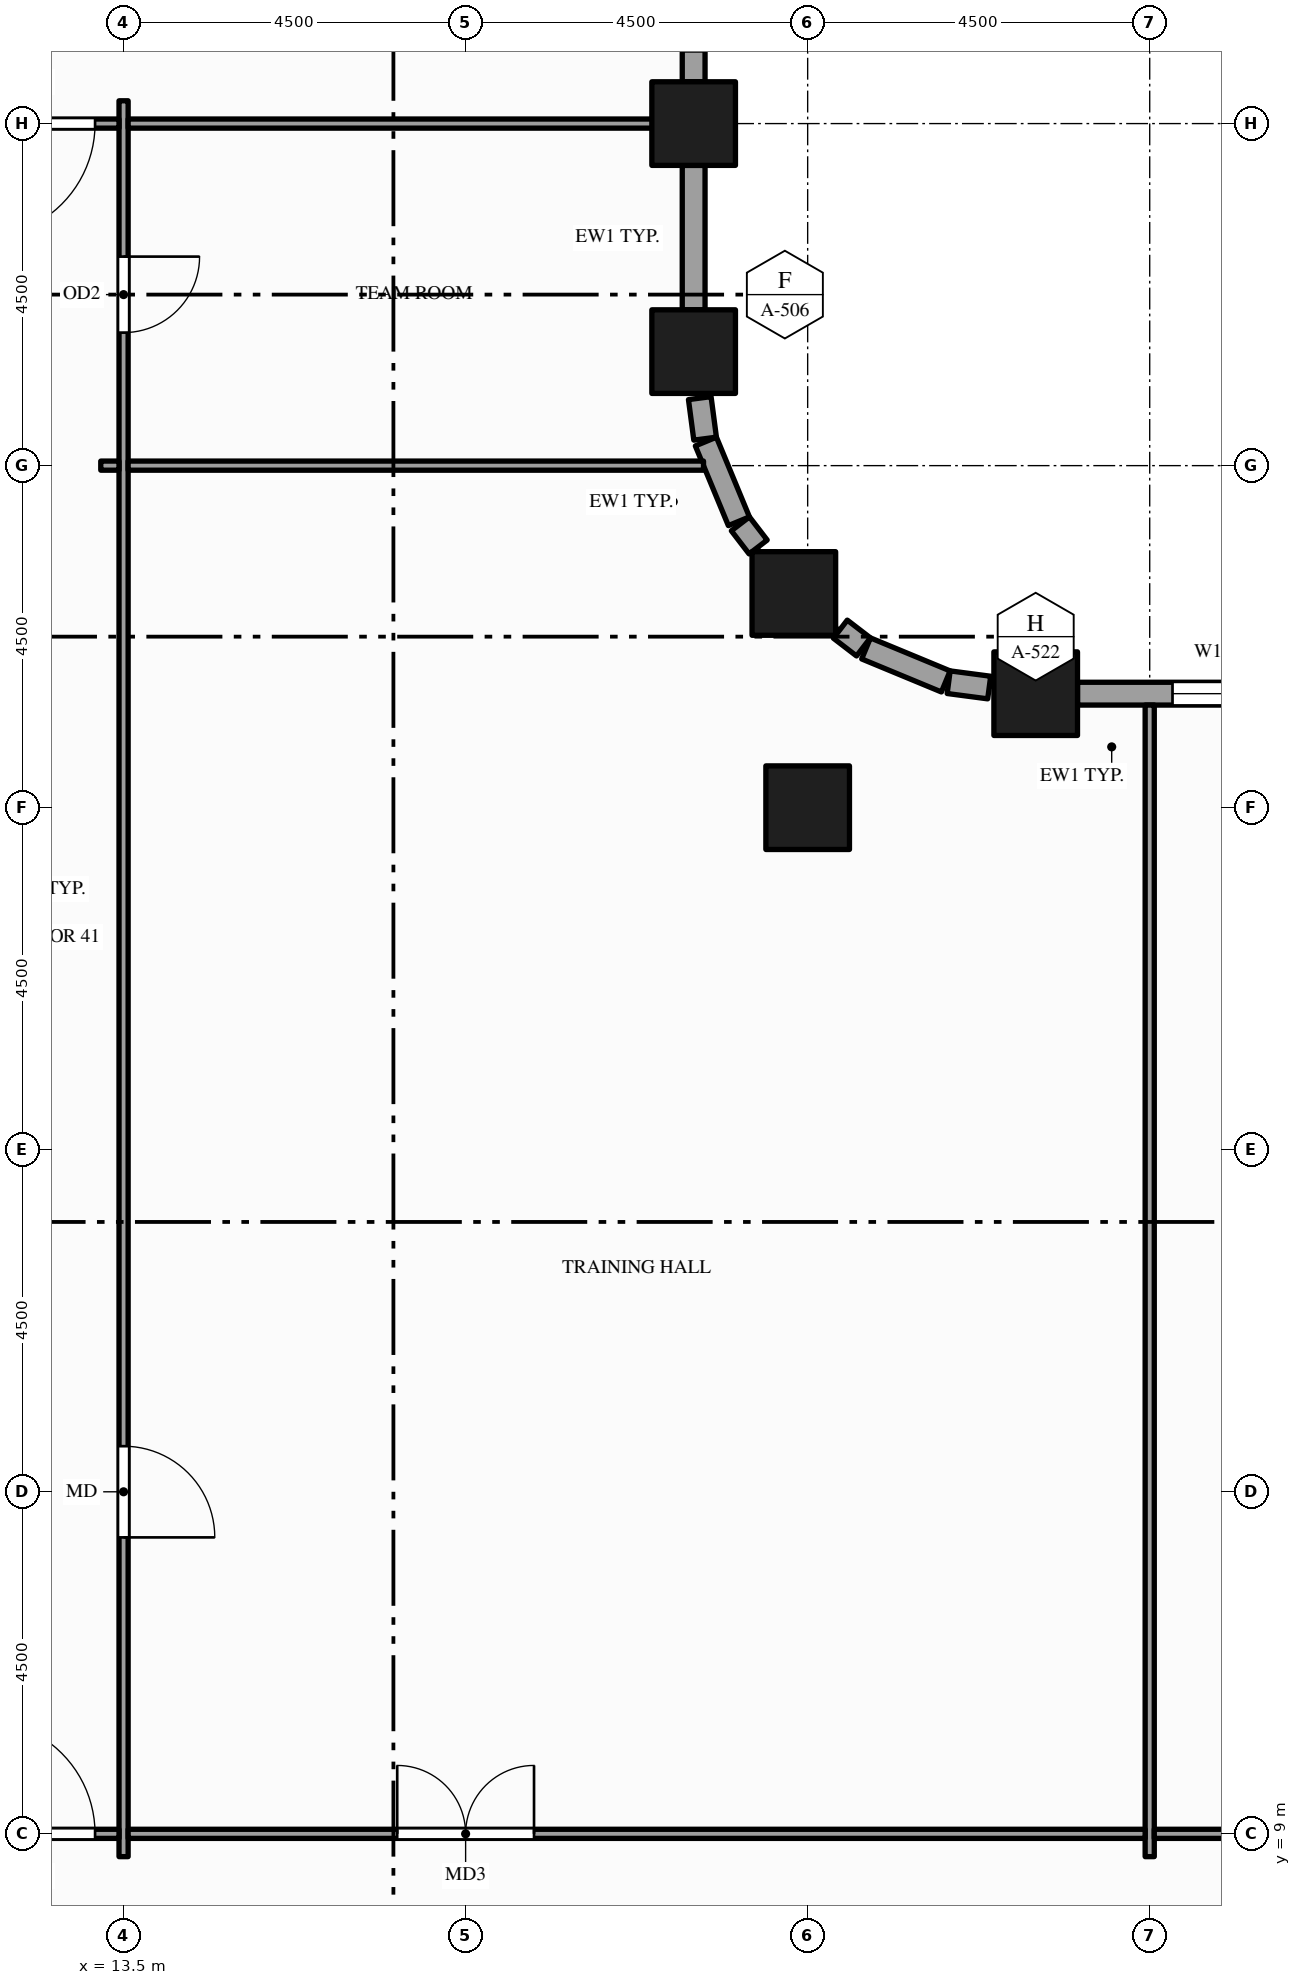
"""IFC4 building model, lengths in metres.
Left out: names, types, materials, properties, quantities, classifications, styles, units other than length and angle.
Written with IfcOpenShell. Run it as: python <this file> out.ifc"""

import sys

from ifc_helpers import new_model, si_unit, direction, frame, frame_2d, origin, origin_2d, place, context, subcontext, project, spatial, rectangle, hollow_rectangle, extrude, element, fill, save


model = new_model("IFC4")
c1 = context("Model", 3, precision=1e-05, world=origin(), true_north=direction((0.0, 1.0)))
c2 = subcontext(c1, "Body", "Model", "MODEL_VIEW")
j1 = project(units=[si_unit("LENGTHUNIT", "METRE"), si_unit("PLANEANGLEUNIT", "RADIAN")], contexts=[c1])
p1 = place(None, origin())
s1 = spatial("IfcSite", under=j1, at=p1, CompositionType="ELEMENT")
p2 = place(p1, origin())
s2 = spatial("IfcBuilding", under=s1, at=p2, CompositionType="ELEMENT")
p3 = place(p2, frame((0.0, 0.0, 57.0)))
s3 = spatial("IfcBuildingStorey", under=s2, at=p3, CompositionType="ELEMENT", Elevation=57.0)
for number, where, z_axis, x_axis in (
    (1, (21.0, 28.5, -0.15), (0.0, 0.0, 1.0), (1.0, 0.0, 0.0)),
    (2, (21.0, 31.5, -0.15), (0.0, 0.0, 1.0), (1.0, 0.0, 0.0)),
    (3, (22.318, 25.318, -0.15), (0.0, 0.0, 1.0), (1.0, 0.0, 0.0)),
    (4, (22.5, 22.5, -0.15), (0.0, 0.0, 1.0), (1.0, 0.0, 0.0)),
    (5, (25.5, 24.0, -0.15), (0.0, 0.0, 1.0), (1.0, 0.0, 0.0)),
):
    element("IfcColumn", number, at=place(p3, frame(where, z_axis=z_axis, x_axis=x_axis)), inside=s3, PredefinedType="COLUMN", context=c2, shape_type="SweptSolid", body=[
        extrude(hollow_rectangle(XDim=1.1, YDim=1.1, WallThickness=0.06, at=origin_2d()), origin(), (0.0, 0.0, 1.0), 4.0),
    ])
p4 = place(p3, frame((30.95, 24.0, 0.0), z_axis=(0.0, 0.0, 1.0), x_axis=(-1.0, 0.0, 0.0)))
e6 = element("IfcWall", 6, at=p4, inside=s3, PredefinedType="STANDARD", context=c2, shape_type="SweptSolid", body=[
    extrude(rectangle(XDim=4.9, YDim=0.3, at=frame_2d((2.45, 0.0))), origin(), (0.0, 0.0, 1.0), 3.144),
])
p5 = place(p4, frame((0.4, 0.0, 0.9)))
e7 = element("IfcOpeningElement", 7, at=p5, cuts=e6, PredefinedType="OPENING", context=c2, shape_type="SweptSolid", body=[
    extrude(rectangle(XDim=1.0, YDim=2.0, at=frame_2d((0.5, 1.0))), frame((0.0, 0.16, 0.0), z_axis=(0.0, -1.0, 0.0), x_axis=(1.0, 0.0, 0.0)), (0.0, 0.0, 1.0), 0.32),
])
p6 = place(p4, frame((2.0, 0.0, 0.9)))
e8 = element("IfcOpeningElement", 8, at=p6, cuts=e6, PredefinedType="OPENING", context=c2, shape_type="SweptSolid", body=[
    extrude(rectangle(XDim=1.65, YDim=2.0, at=frame_2d((0.825, 1.0))), frame((0.0, 0.16, 0.0), z_axis=(0.0, -1.0, 0.0), x_axis=(1.0, 0.0, 0.0)), (0.0, 0.0, 1.0), 0.32),
])
p7 = place(p3, frame((24.888, 24.081, 0.0), z_axis=(0.0, 0.0, 1.0), x_axis=(-0.991417173479, 0.130736330569, 0.0)))
e9 = element("IfcWall", 9, at=p7, inside=s3, PredefinedType="STANDARD", context=c2, shape_type="SweptSolid", body=[
    extrude(rectangle(XDim=0.538, YDim=0.3, at=frame_2d((0.269, 0.0))), origin(), (0.0, 0.0, 1.0), 2.938),
])
p8 = place(p3, frame((24.317, 24.161, 0.0), z_axis=(0.0, 0.0, 1.0), x_axis=(-0.923914616768, 0.382598720491, 0.0)))
e10 = element("IfcWall", 10, at=p8, inside=s3, PredefinedType="STANDARD", context=c2, shape_type="SweptSolid", body=[
    extrude(rectangle(XDim=1.135, YDim=0.3, at=frame_2d((0.568, 0.0))), origin(), (0.0, 0.0, 1.0), 3.144),
])
for number, where, z_axis, x_axis in (
    (11, (23.234, 24.615, 0.0), (0.0, 0.0, 1.0), (-0.794, 0.609, 0.0)),
    (12, (21.849, 25.93, 0.0), (0.0, 0.0, 1.0), (-0.609, 0.794, 0.0)),
):
    element("IfcWall", number, at=place(p3, frame(where, z_axis=z_axis, x_axis=x_axis)), inside=s3, PredefinedType="STANDARD", context=c2, shape_type="SweptSolid", body=[
        extrude(rectangle(XDim=0.384, YDim=0.3, at=frame_2d((0.192, 0.0))), origin(), (0.0, 0.0, 1.0), 3.144),
    ])
p9 = place(p3, frame((21.595, 26.268, 0.0), z_axis=(0.0, 0.0, 1.0), x_axis=(-0.382598720491, 0.923914616768, 0.0)))
e13 = element("IfcWall", 13, at=p9, inside=s3, PredefinedType="STANDARD", context=c2, shape_type="SweptSolid", body=[
    extrude(rectangle(XDim=1.135, YDim=0.3, at=frame_2d((0.568, 0.0))), origin(), (0.0, 0.0, 1.0), 3.144),
])
p10 = place(p3, frame((21.151, 27.355, 0.0), z_axis=(0.0, 0.0, 1.0), x_axis=(-0.130736330569, 0.991417173479, 0.0)))
e14 = element("IfcWall", 14, at=p10, inside=s3, PredefinedType="STANDARD", context=c2, shape_type="SweptSolid", body=[
    extrude(rectangle(XDim=0.538, YDim=0.3, at=frame_2d((0.269, 0.0))), origin(), (0.0, 0.0, 1.0), 3.144),
])
p11 = place(p3, frame((21.0, 29.05, 0.0), z_axis=(0.0, 0.0, 1.0), x_axis=(0.0, 1.0, 0.0)))
e15 = element("IfcWall", 15, at=p11, inside=s3, PredefinedType="STANDARD", context=c2, shape_type="SweptSolid", body=[
    extrude(rectangle(XDim=1.9, YDim=0.3, at=frame_2d((0.95, 0.0))), origin(), (0.0, 0.0, 1.0), 3.144),
])
p12 = place(p3, frame((21.0, 32.05, 0.0), z_axis=(0.0, 0.0, 1.0), x_axis=(0.0, 1.0, 0.0)))
e16 = element("IfcWall", 16, at=p12, inside=s3, PredefinedType="STANDARD", context=c2, shape_type="SweptSolid", body=[
    extrude(rectangle(XDim=3.95, YDim=0.3, at=frame_2d((1.975, 0.0))), origin(), (0.0, 0.0, 1.0), 3.144),
])
p13 = place(p12, frame((0.4, 0.0, 0.9)))
e17 = element("IfcOpeningElement", 17, at=p13, cuts=e16, PredefinedType="OPENING", context=c2, shape_type="SweptSolid", body=[
    extrude(rectangle(XDim=1.0, YDim=2.0, at=frame_2d((0.5, 1.0))), frame((0.0, 0.16, 0.0), z_axis=(0.0, -1.0, 0.0), x_axis=(1.0, 0.0, 0.0)), (0.0, 0.0, 1.0), 0.32),
])
p14 = place(p12, frame((2.0, 0.0, 0.9)))
e18 = element("IfcOpeningElement", 18, at=p14, cuts=e16, PredefinedType="OPENING", context=c2, shape_type="SweptSolid", body=[
    extrude(rectangle(XDim=1.55, YDim=2.0, at=frame_2d((0.775, 1.0))), frame((0.0, 0.16, 0.0), z_axis=(0.0, -1.0, 0.0), x_axis=(1.0, 0.0, 0.0)), (0.0, 0.0, 1.0), 0.32),
])
p15 = place(p3, frame((13.5, 8.7, 0.0), z_axis=(0.0, 0.0, 1.0), x_axis=(0.0, 1.0, 0.0)))
e19 = element("IfcWall", 19, at=p15, inside=s3, PredefinedType="PARTITIONING", context=c2, shape_type="SweptSolid", body=[
    extrude(rectangle(XDim=23.1, YDim=0.12, at=frame_2d((11.55, 0.0))), origin(), (0.0, 0.0, 1.0), 2.6),
])
p16 = place(p15, frame((20.05, 0.0, 0.0)))
e20 = element("IfcOpeningElement", 20, at=p16, cuts=e19, PredefinedType="OPENING", context=c2, shape_type="SweptSolid", body=[
    extrude(rectangle(XDim=1.0, YDim=2.1, at=frame_2d((0.5, 1.05))), frame((0.0, 0.07, 0.0), z_axis=(0.0, -1.0, 0.0), x_axis=(1.0, 0.0, 0.0)), (0.0, 0.0, 1.0), 0.14),
])
p17 = place(p15, frame((4.2, 0.0, 0.0)))
e21 = element("IfcOpeningElement", 21, at=p17, cuts=e19, PredefinedType="OPENING", context=c2, shape_type="SweptSolid", body=[
    extrude(rectangle(XDim=1.2, YDim=2.1, at=frame_2d((0.6, 1.05))), frame((0.0, 0.07, 0.0), z_axis=(0.0, -1.0, 0.0), x_axis=(1.0, 0.0, 0.0)), (0.0, 0.0, 1.0), 0.14),
])
p18 = place(p3, frame((27.0, 8.7, 0.0), z_axis=(0.0, 0.0, 1.0), x_axis=(0.0, 1.0, 0.0)))
e22 = element("IfcWall", 22, at=p18, inside=s3, PredefinedType="PARTITIONING", context=c2, shape_type="SweptSolid", body=[
    extrude(rectangle(XDim=15.15, YDim=0.12, at=frame_2d((7.575, 0.0))), origin(), (0.0, 0.0, 1.0), 2.938),
])
p19 = place(p3, frame((11.31, 9.0, 0.0), z_axis=(0.0, 0.0, 1.0), x_axis=(1.0, 0.0, 0.0)))
e23 = element("IfcWall", 23, at=p19, inside=s3, PredefinedType="PARTITIONING", context=c2, shape_type="SweptSolid", body=[
    extrude(rectangle(XDim=2.13, YDim=0.12, at=frame_2d((1.065, 0.0))), origin(), (0.0, 0.0, 1.0), 2.938),
])
p20 = place(p19, frame((0.315, 0.0, 0.0)))
e24 = element("IfcOpeningElement", 24, at=p20, cuts=e23, PredefinedType="OPENING", context=c2, shape_type="SweptSolid", body=[
    extrude(rectangle(XDim=1.5, YDim=2.1, at=frame_2d((0.75, 1.05))), frame((0.0, 0.07, 0.0), z_axis=(0.0, -1.0, 0.0), x_axis=(1.0, 0.0, 0.0)), (0.0, 0.0, 1.0), 0.14),
])
p21 = place(p3, frame((13.56, 9.0, 0.0), z_axis=(0.0, 0.0, 1.0), x_axis=(1.0, 0.0, 0.0)))
e25 = element("IfcWall", 25, at=p21, inside=s3, PredefinedType="PARTITIONING", context=c2, shape_type="SweptSolid", body=[
    extrude(rectangle(XDim=13.38, YDim=0.12, at=frame_2d((6.69, 0.0))), origin(), (0.0, 0.0, 1.0), 2.938),
])
p22 = place(p21, frame((3.54, 0.0, 0.0)))
e26 = element("IfcOpeningElement", 26, at=p22, cuts=e25, PredefinedType="OPENING", context=c2, shape_type="SweptSolid", body=[
    extrude(rectangle(XDim=1.8, YDim=2.1, at=frame_2d((0.9, 1.05))), frame((0.0, 0.07, 0.0), z_axis=(0.0, -1.0, 0.0), x_axis=(1.0, 0.0, 0.0)), (0.0, 0.0, 1.0), 0.14),
])
p23 = place(p3, frame((27.06, 9.0, 0.0), z_axis=(0.0, 0.0, 1.0), x_axis=(1.0, 0.0, 0.0)))
e27 = element("IfcWall", 27, at=p23, inside=s3, PredefinedType="PARTITIONING", context=c2, shape_type="SweptSolid", body=[
    extrude(rectangle(XDim=11.13, YDim=0.12, at=frame_2d((5.565, 0.0))), origin(), (0.0, 0.0, 1.0), 2.938),
])
p24 = place(p23, frame((4.665, 0.0, 0.0)))
e28 = element("IfcOpeningElement", 28, at=p24, cuts=e27, PredefinedType="OPENING", context=c2, shape_type="SweptSolid", body=[
    extrude(rectangle(XDim=1.8, YDim=2.1, at=frame_2d((0.9, 1.05))), frame((0.0, 0.07, 0.0), z_axis=(0.0, -1.0, 0.0), x_axis=(1.0, 0.0, 0.0)), (0.0, 0.0, 1.0), 0.14),
])
p25 = place(p3, frame((13.2, 27.0, 0.0), z_axis=(0.0, 0.0, 1.0), x_axis=(1.0, 0.0, 0.0)))
e29 = element("IfcWall", 29, at=p25, inside=s3, PredefinedType="PARTITIONING", context=c2, shape_type="SweptSolid", body=[
    extrude(rectangle(XDim=0.24, YDim=0.12, at=frame_2d((0.12, 0.0))), origin(), (0.0, 0.0, 1.0), 2.938),
])
p26 = place(p3, frame((13.56, 27.0, 0.0), z_axis=(0.0, 0.0, 1.0), x_axis=(1.0, 0.0, 0.0)))
e30 = element("IfcWall", 30, at=p26, inside=s3, PredefinedType="PARTITIONING", context=c2, shape_type="SweptSolid", body=[
    extrude(rectangle(XDim=7.57, YDim=0.12, at=frame_2d((3.785, 0.0))), origin(), (0.0, 0.0, 1.0), 2.938),
])
p27 = place(p3, frame((11.31, 31.5, 0.0), z_axis=(0.0, 0.0, 1.0), x_axis=(1.0, 0.0, 0.0)))
e31 = element("IfcWall", 31, at=p27, inside=s3, PredefinedType="PARTITIONING", context=c2, shape_type="SweptSolid", body=[
    extrude(rectangle(XDim=2.13, YDim=0.12, at=frame_2d((1.065, 0.0))), origin(), (0.0, 0.0, 1.0), 2.938),
])
p28 = place(p27, frame((0.315, 0.0, 0.0)))
e32 = element("IfcOpeningElement", 32, at=p28, cuts=e31, PredefinedType="OPENING", context=c2, shape_type="SweptSolid", body=[
    extrude(rectangle(XDim=1.5, YDim=2.1, at=frame_2d((0.75, 1.05))), frame((0.0, 0.07, 0.0), z_axis=(0.0, -1.0, 0.0), x_axis=(1.0, 0.0, 0.0)), (0.0, 0.0, 1.0), 0.14),
])
p29 = place(p3, frame((13.56, 31.5, 0.0), z_axis=(0.0, 0.0, 1.0), x_axis=(1.0, 0.0, 0.0)))
e33 = element("IfcWall", 33, at=p29, inside=s3, PredefinedType="PARTITIONING", context=c2, shape_type="SweptSolid", body=[
    extrude(rectangle(XDim=7.29, YDim=0.12, at=frame_2d((3.645, 0.0))), origin(), (0.0, 0.0, 1.0), 2.938),
])
p30 = place(p6, origin())
e34 = element("IfcWindow", 34, at=p30, inside=s3, PartitioningType="SINGLE_PANEL", PredefinedType="WINDOW", context=c2, shape_type="SweptSolid", body=[
    extrude(rectangle(XDim=1.65, YDim=2.0, at=frame_2d((0.825, 1.0))), frame((0.0, 0.03, 0.0), z_axis=(0.0, -1.0, 0.0), x_axis=(1.0, 0.0, 0.0)), (0.0, 0.0, 1.0), 0.06),
])
fill(e8, e34)
p31 = place(p22, origin())
e35 = element("IfcDoor", 35, at=p31, inside=s3, OperationType="DOUBLE_DOOR_SINGLE_SWING", PredefinedType="DOOR", context=c2, shape_type="SweptSolid", body=[
    extrude(rectangle(XDim=1.8, YDim=2.1, at=frame_2d((0.9, 1.05))), frame((0.0, 0.025, 0.0), z_axis=(0.0, -1.0, 0.0), x_axis=(1.0, 0.0, 0.0)), (0.0, 0.0, 1.0), 0.05),
])
fill(e26, e35)
p32 = place(p20, origin())
e36 = element("IfcDoor", 36, at=p32, inside=s3, OperationType="SINGLE_SWING_LEFT", PredefinedType="DOOR", context=c2, shape_type="SweptSolid", body=[
    extrude(rectangle(XDim=1.5, YDim=2.1, at=frame_2d((0.75, 1.05))), frame((0.0, 0.025, 0.0), z_axis=(0.0, -1.0, 0.0), x_axis=(1.0, 0.0, 0.0)), (0.0, 0.0, 1.0), 0.05),
])
fill(e24, e36)
p33 = place(p28, origin())
e37 = element("IfcDoor", 37, at=p33, inside=s3, OperationType="SINGLE_SWING_LEFT", PredefinedType="DOOR", context=c2, shape_type="SweptSolid", body=[
    extrude(rectangle(XDim=1.5, YDim=2.1, at=frame_2d((0.75, 1.05))), frame((0.0, 0.025, 0.0), z_axis=(0.0, -1.0, 0.0), x_axis=(1.0, 0.0, 0.0)), (0.0, 0.0, 1.0), 0.05),
])
fill(e32, e37)
p34 = place(p16, origin())
e38 = element("IfcDoor", 38, at=p34, inside=s3, OperationType="SINGLE_SWING_RIGHT", PredefinedType="DOOR", context=c2, shape_type="SweptSolid", body=[
    extrude(rectangle(XDim=1.0, YDim=2.1, at=frame_2d((0.5, 1.05))), frame((0.0, 0.025, 0.0), z_axis=(0.0, -1.0, 0.0), x_axis=(1.0, 0.0, 0.0)), (0.0, 0.0, 1.0), 0.05),
])
fill(e20, e38)
p35 = place(p17, origin())
e39 = element("IfcDoor", 39, at=p35, inside=s3, OperationType="SINGLE_SWING_LEFT", PredefinedType="DOOR", context=c2, shape_type="SweptSolid", body=[
    extrude(rectangle(XDim=1.2, YDim=2.1, at=frame_2d((0.6, 1.05))), frame((0.0, 0.025, 0.0), z_axis=(0.0, -1.0, 0.0), x_axis=(1.0, 0.0, 0.0)), (0.0, 0.0, 1.0), 0.05),
])
fill(e21, e39)
save(model, sys.argv[1])
